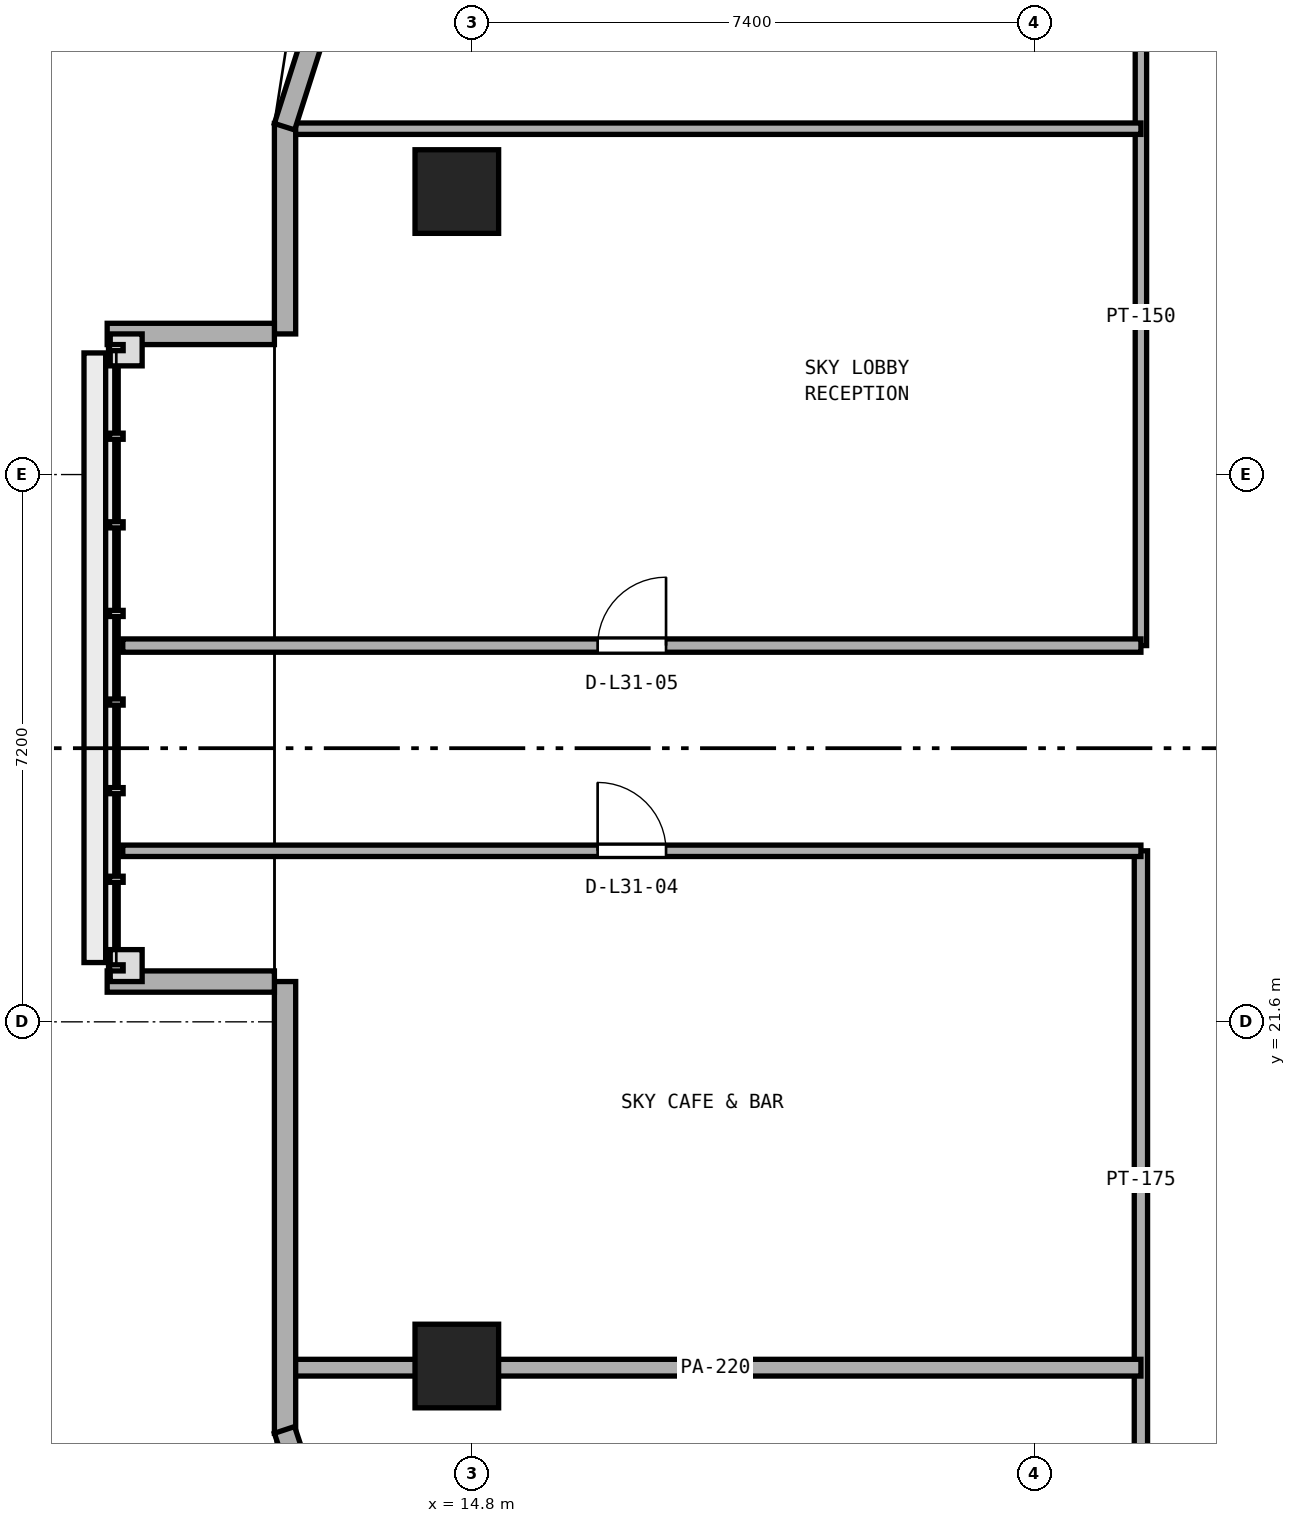
"""IFC4 building model, lengths in metres.
Left out: names, types, materials, properties, quantities, classifications, styles, units other than length and angle.
Written with IfcOpenShell. Run it as: python <this file> out.ifc"""

import sys

from ifc_helpers import new_model, si_unit, direction, frame, frame_2d, origin, origin_2d, place, context, subcontext, project, spatial, rectangle, extrude, element, fill, save


model = new_model("IFC4")
c1 = context("Model", 3, precision=1e-05, world=origin(), true_north=direction((0.0, 1.0)))
c2 = subcontext(c1, "Body", "Model", "MODEL_VIEW")
j1 = project(units=[si_unit("LENGTHUNIT", "METRE"), si_unit("PLANEANGLEUNIT", "RADIAN")], contexts=[c1])
p1 = place(None, origin())
s1 = spatial("IfcSite", under=j1, at=p1, CompositionType="ELEMENT")
p2 = place(p1, origin())
s2 = spatial("IfcBuilding", under=s1, at=p2, CompositionType="ELEMENT")
p3 = place(p2, frame((0.0, 0.0, 125.0)))
s3 = spatial("IfcBuildingStorey", under=s2, at=p3, CompositionType="ELEMENT", Elevation=125.0)
for number, where, z_axis, x_axis in (
    (1, (14.6, 32.523, 0.0), (0.0, 0.0, 1.0), (1.0, 0.0, 0.0)),
    (2, (14.6, 17.072, 0.0), (0.0, 0.0, 1.0), (1.0, 0.0, 0.0)),
):
    element("IfcColumn", number, at=place(p3, frame(where, z_axis=z_axis, x_axis=x_axis)), inside=s3, PredefinedType="COLUMN", context=c2, shape_type="SweptSolid", body=[
        extrude(rectangle(XDim=1.1, YDim=1.1, at=origin_2d()), origin(), (0.0, 0.0, 1.0), 3.8),
    ])
p4 = place(p3, frame((23.6, 15.2, 0.0), z_axis=(0.0, 0.0, 1.0), x_axis=(0.0, 1.0, 0.0)))
e3 = element("IfcWall", 3, at=p4, inside=s3, PredefinedType="PARTITIONING", context=c2, shape_type="SweptSolid", body=[
    extrude(rectangle(XDim=8.65, YDim=0.175, at=frame_2d((4.325, 0.0))), origin(), (0.0, 0.0, 1.0), 3.54),
])
p5 = place(p3, frame((23.6, 26.55, 0.0), z_axis=(0.0, 0.0, 1.0), x_axis=(0.0, 1.0, 0.0)))
e4 = element("IfcWall", 4, at=p5, inside=s3, PredefinedType="PARTITIONING", context=c2, shape_type="SweptSolid", body=[
    extrude(rectangle(XDim=8.65, YDim=0.15, at=frame_2d((4.325, 0.0))), origin(), (0.0, 0.0, 1.0), 3.54),
])
p6 = place(p3, frame((12.405, 17.05, 0.0), z_axis=(0.0, 0.0, 1.0), x_axis=(1.0, 0.0, 0.0)))
e5 = element("IfcWall", 5, at=p6, inside=s3, PredefinedType="PARTITIONING", context=c2, shape_type="SweptSolid", body=[
    extrude(rectangle(XDim=11.195, YDim=0.22, at=frame_2d((5.598, 0.0))), origin(), (0.0, 0.0, 1.0), 2.79),
])
p7 = place(p3, frame((10.205, 23.85, 0.0), z_axis=(0.0, 0.0, 1.0), x_axis=(1.0, 0.0, 0.0)))
e6 = element("IfcWall", 6, at=p7, inside=s3, PredefinedType="PARTITIONING", context=c2, shape_type="SweptSolid", body=[
    extrude(rectangle(XDim=13.395, YDim=0.15, at=frame_2d((6.698, 0.0))), origin(), (0.0, 0.0, 1.0), 3.54),
])
p8 = place(p7, frame((6.248, 0.0, 0.0)))
e7 = element("IfcOpeningElement", 7, at=p8, cuts=e6, PredefinedType="OPENING", context=c2, shape_type="SweptSolid", body=[
    extrude(rectangle(XDim=0.9, YDim=2.1, at=frame_2d((0.45, 1.05))), frame((0.0, 0.085, 0.0), z_axis=(0.0, -1.0, 0.0), x_axis=(1.0, 0.0, 0.0)), (0.0, 0.0, 1.0), 0.17),
])
p9 = place(p3, frame((10.205, 26.55, 0.0), z_axis=(0.0, 0.0, 1.0), x_axis=(1.0, 0.0, 0.0)))
e8 = element("IfcWall", 8, at=p9, inside=s3, PredefinedType="PARTITIONING", context=c2, shape_type="SweptSolid", body=[
    extrude(rectangle(XDim=13.395, YDim=0.175, at=frame_2d((6.698, 0.0))), origin(), (0.0, 0.0, 1.0), 3.54),
])
p10 = place(p9, frame((6.248, 0.0, 0.0)))
e9 = element("IfcOpeningElement", 9, at=p10, cuts=e8, PredefinedType="OPENING", context=c2, shape_type="SweptSolid", body=[
    extrude(rectangle(XDim=0.9, YDim=2.1, at=frame_2d((0.45, 1.05))), frame((0.0, 0.097, 0.0), z_axis=(0.0, -1.0, 0.0), x_axis=(1.0, 0.0, 0.0)), (0.0, 0.0, 1.0), 0.195),
])
p11 = place(p3, frame((12.405, 33.35, 0.0), z_axis=(0.0, 0.0, 1.0), x_axis=(1.0, 0.0, 0.0)))
e10 = element("IfcWall", 10, at=p11, inside=s3, PredefinedType="PARTITIONING", context=c2, shape_type="SweptSolid", body=[
    extrude(rectangle(XDim=11.195, YDim=0.15, at=frame_2d((5.598, 0.0))), origin(), (0.0, 0.0, 1.0), 2.79),
])
p12 = place(p3, frame((12.34, 33.419, 0.0), z_axis=(0.0, 0.0, 1.0), x_axis=(0.0, -1.0, 0.0)))
e11 = element("IfcWall", 11, at=p12, inside=s3, PredefinedType="STANDARD", context=c2, shape_type="SweptSolid", body=[
    extrude(rectangle(XDim=2.769, YDim=0.28, at=frame_2d((1.385, 0.0))), origin(), (0.0, 0.0, 1.0), 3.54),
])
p13 = place(p3, frame((12.34, 22.13, 0.0), z_axis=(0.0, 0.0, 1.0), x_axis=(0.0, -1.0, 0.0)))
e12 = element("IfcWall", 12, at=p13, inside=s3, PredefinedType="STANDARD", context=c2, shape_type="SweptSolid", body=[
    extrude(rectangle(XDim=5.943, YDim=0.28, at=frame_2d((2.971, 0.0))), origin(), (0.0, 0.0, 1.0), 3.54),
])
p14 = place(p3, frame((13.053, 35.634, 0.0), z_axis=(0.0, 0.0, 1.0), x_axis=(-0.303807416298, -0.952733464198, 0.0)))
e13 = element("IfcWall", 13, at=p14, inside=s3, PredefinedType="STANDARD", context=c2, shape_type="SweptSolid", body=[
    extrude(rectangle(XDim=2.37, YDim=0.28, at=frame_2d((1.185, 0.0))), origin(), (0.0, 0.0, 1.0), 3.54),
])
p15 = place(p3, frame((12.333, 16.231, 0.0), z_axis=(0.0, 0.0, 1.0), x_axis=(0.315364302967, -0.94897068259, 0.0)))
e14 = element("IfcWall", 14, at=p15, inside=s3, PredefinedType="STANDARD", context=c2, shape_type="SweptSolid", body=[
    extrude(rectangle(XDim=2.46, YDim=0.28, at=frame_2d((1.23, 0.0))), origin(), (0.0, 0.0, 1.0), 3.54),
])
p16 = place(p3, frame((10.0, 22.13, 0.0), z_axis=(0.0, 0.0, 1.0), x_axis=(1.0, 0.0, 0.0)))
e15 = element("IfcWall", 15, at=p16, inside=s3, PredefinedType="STANDARD", context=c2, shape_type="SweptSolid", body=[
    extrude(rectangle(XDim=2.2, YDim=0.28, at=frame_2d((1.1, 0.0))), origin(), (0.0, 0.0, 1.0), 3.54),
])
p17 = place(p3, frame((10.0, 30.65, 0.0), z_axis=(0.0, 0.0, 1.0), x_axis=(1.0, 0.0, 0.0)))
e16 = element("IfcWall", 16, at=p17, inside=s3, PredefinedType="STANDARD", context=c2, shape_type="SweptSolid", body=[
    extrude(rectangle(XDim=2.2, YDim=0.28, at=frame_2d((1.1, 0.0))), origin(), (0.0, 0.0, 1.0), 2.847),
])
p18 = place(p8, origin())
e17 = element("IfcDoor", 17, at=p18, inside=s3, OperationType="SINGLE_SWING_LEFT", PredefinedType="DOOR", context=c2, shape_type="SweptSolid", body=[
    extrude(rectangle(XDim=0.9, YDim=2.1, at=frame_2d((0.45, 1.05))), frame((0.0, 0.025, 0.0), z_axis=(0.0, -1.0, 0.0), x_axis=(1.0, 0.0, 0.0)), (0.0, 0.0, 1.0), 0.05),
])
fill(e7, e17)
p19 = place(p10, origin())
e18 = element("IfcDoor", 18, at=p19, inside=s3, OperationType="SINGLE_SWING_RIGHT", PredefinedType="DOOR", context=c2, shape_type="SweptSolid", body=[
    extrude(rectangle(XDim=0.9, YDim=2.1, at=frame_2d((0.45, 1.05))), frame((0.0, 0.025, 0.0), z_axis=(0.0, -1.0, 0.0), x_axis=(1.0, 0.0, 0.0)), (0.0, 0.0, 1.0), 0.05),
])
fill(e9, e18)
save(model, sys.argv[1])
